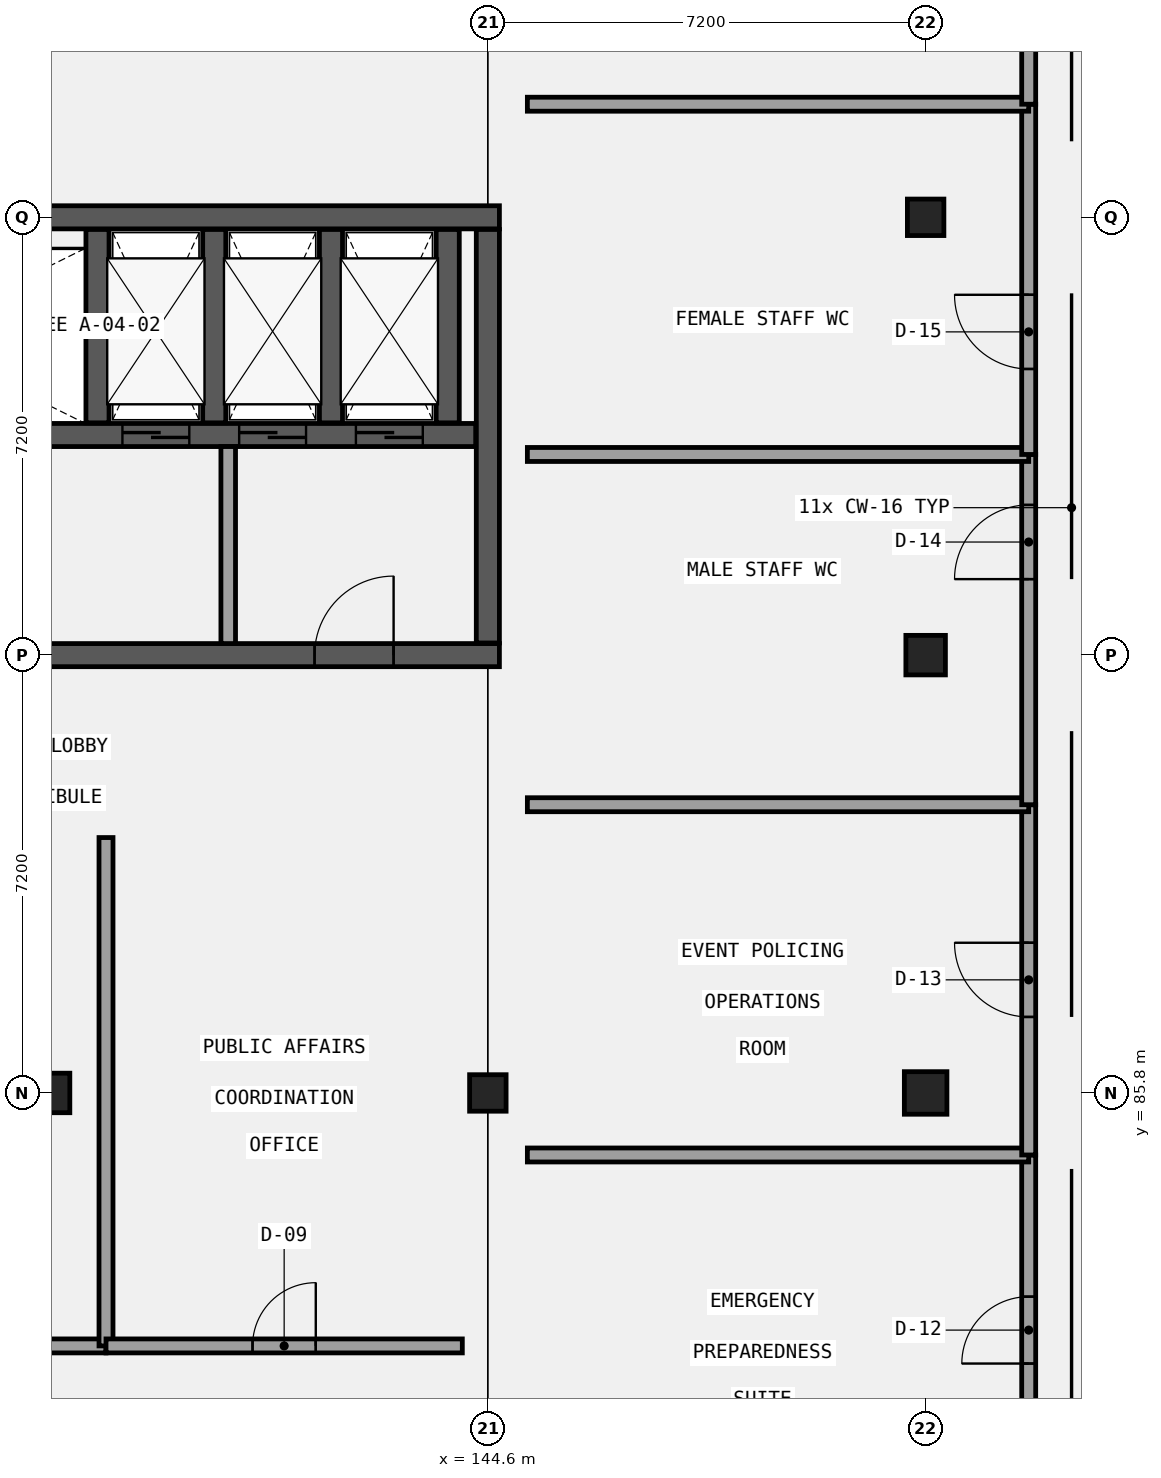
"""IFC4 building model, lengths in metres.
Left out: names, types, materials, properties, quantities, classifications, styles, units other than length and angle.
Written with IfcOpenShell. Run it as: python <this file> out.ifc"""

import sys

from ifc_helpers import new_model, si_unit, direction, frame, frame_2d, origin, origin_2d, place, context, subcontext, project, spatial, rectangle, extrude, element, fill, save


model = new_model("IFC4")
c1 = context("Model", 3, precision=1e-05, world=origin(), true_north=direction((0.0, 1.0)))
c2 = subcontext(c1, "Body", "Model", "MODEL_VIEW")
j1 = project(units=[si_unit("LENGTHUNIT", "METRE"), si_unit("PLANEANGLEUNIT", "RADIAN")], contexts=[c1])
p1 = place(None, origin())
s1 = spatial("IfcSite", under=j1, at=p1, CompositionType="ELEMENT")
p2 = place(p1, origin())
s2 = spatial("IfcBuilding", under=s1, at=p2, CompositionType="ELEMENT")
p3 = place(p2, frame((0.0, 0.0, 9.6)))
s3 = spatial("IfcBuildingStorey", under=s2, at=p3, CompositionType="ELEMENT", Elevation=9.6)
p4 = place(p3, frame((130.01, 100.2, 0.0), z_axis=(0.0, 0.0, 1.0), x_axis=(1.0, 0.0, 0.0)))
e1 = element("IfcWall", 1, at=p4, inside=s3, PredefinedType="SHEAR", context=c2, shape_type="SweptSolid", body=[
    extrude(rectangle(XDim=14.78, YDim=0.38, at=frame_2d((7.39, 0.0))), origin(), (0.0, 0.0, 1.0), 4.2),
])
p5 = place(p3, frame((130.01, 93.0, 0.0), z_axis=(0.0, 0.0, 1.0), x_axis=(1.0, 0.0, 0.0)))
e2 = element("IfcWall", 2, at=p5, inside=s3, PredefinedType="SHEAR", context=c2, shape_type="SweptSolid", body=[
    extrude(rectangle(XDim=14.78, YDim=0.38, at=frame_2d((7.39, 0.0))), origin(), (0.0, 0.0, 1.0), 4.2),
])
p6 = place(p5, frame((3.74, 0.0, 0.0)))
e3 = element("IfcOpeningElement", 3, at=p6, cuts=e2, PredefinedType="OPENING", context=c2, shape_type="SweptSolid", body=[
    extrude(rectangle(XDim=1.3, YDim=2.2, at=frame_2d((0.65, 1.1))), frame((0.0, 0.2, 0.0), z_axis=(0.0, -1.0, 0.0), x_axis=(1.0, 0.0, 0.0)), (0.0, 0.0, 1.0), 0.4),
])
p7 = place(p5, frame((11.74, 0.0, 0.0)))
e4 = element("IfcOpeningElement", 4, at=p7, cuts=e2, PredefinedType="OPENING", context=c2, shape_type="SweptSolid", body=[
    extrude(rectangle(XDim=1.3, YDim=2.2, at=frame_2d((0.65, 1.1))), frame((0.0, 0.2, 0.0), z_axis=(0.0, -1.0, 0.0), x_axis=(1.0, 0.0, 0.0)), (0.0, 0.0, 1.0), 0.4),
])
p8 = place(p3, frame((144.6, 93.2, 0.0), z_axis=(0.0, 0.0, 1.0), x_axis=(0.0, 1.0, 0.0)))
e5 = element("IfcWall", 5, at=p8, inside=s3, PredefinedType="SHEAR", context=c2, shape_type="SweptSolid", body=[
    extrude(rectangle(XDim=6.8, YDim=0.38, at=frame_2d((3.4, 0.0))), origin(), (0.0, 0.0, 1.0), 4.2),
])
p9 = place(p3, frame((130.4, 96.62, 0.0), z_axis=(0.0, 0.0, 1.0), x_axis=(1.0, 0.0, 0.0)))
e6 = element("IfcWall", 6, at=p9, inside=s3, PredefinedType="SHEAR", context=c2, shape_type="SweptSolid", body=[
    extrude(rectangle(XDim=14.0, YDim=0.38, at=frame_2d((7.0, 0.0))), origin(), (0.0, 0.0, 1.0), 4.2),
])
p10 = place(p9, frame((8.19, 0.0, 0.0)))
e7 = element("IfcOpeningElement", 7, at=p10, cuts=e6, PredefinedType="OPENING", context=c2, shape_type="SweptSolid", body=[
    extrude(rectangle(XDim=1.1, YDim=2.15, at=frame_2d((0.55, 1.075))), frame((0.0, 0.2, 0.0), z_axis=(0.0, -1.0, 0.0), x_axis=(1.0, 0.0, 0.0)), (0.0, 0.0, 1.0), 0.4),
])
p11 = place(p9, frame((10.11, 0.0, 0.0)))
e8 = element("IfcOpeningElement", 8, at=p11, cuts=e6, PredefinedType="OPENING", context=c2, shape_type="SweptSolid", body=[
    extrude(rectangle(XDim=1.1, YDim=2.15, at=frame_2d((0.55, 1.075))), frame((0.0, 0.2, 0.0), z_axis=(0.0, -1.0, 0.0), x_axis=(1.0, 0.0, 0.0)), (0.0, 0.0, 1.0), 0.4),
])
p12 = place(p9, frame((12.03, 0.0, 0.0)))
e9 = element("IfcOpeningElement", 9, at=p12, cuts=e6, PredefinedType="OPENING", context=c2, shape_type="SweptSolid", body=[
    extrude(rectangle(XDim=1.1, YDim=2.15, at=frame_2d((0.55, 1.075))), frame((0.0, 0.2, 0.0), z_axis=(0.0, -1.0, 0.0), x_axis=(1.0, 0.0, 0.0)), (0.0, 0.0, 1.0), 0.4),
])
p13 = place(p9, frame((0.375, 0.0, 0.0)))
e10 = element("IfcOpeningElement", 10, at=p13, cuts=e6, PredefinedType="OPENING", context=c2, shape_type="SweptSolid", body=[
    extrude(rectangle(XDim=1.15, YDim=2.15, at=frame_2d((0.575, 1.075))), frame((0.0, 0.2, 0.0), z_axis=(0.0, -1.0, 0.0), x_axis=(1.0, 0.0, 0.0)), (0.0, 0.0, 1.0), 0.4),
])
for number, where, z_axis, x_axis in (
    (11, (138.18, 96.82, 0.0), (0.0, 0.0, 1.0), (0.0, 1.0, 0.0)),
    (12, (140.1, 96.82, 0.0), (0.0, 0.0, 1.0), (0.0, 1.0, 0.0)),
    (13, (142.02, 96.82, 0.0), (0.0, 0.0, 1.0), (0.0, 1.0, 0.0)),
    (14, (143.94, 96.82, 0.0), (0.0, 0.0, 1.0), (0.0, 1.0, 0.0)),
):
    element("IfcWall", number, at=place(p3, frame(where, z_axis=z_axis, x_axis=x_axis)), inside=s3, PredefinedType="SHEAR", context=c2, shape_type="SweptSolid", body=[
        extrude(rectangle(XDim=3.18, YDim=0.38, at=frame_2d((1.59, 0.0))), origin(), (0.0, 0.0, 1.0), 4.2),
    ])
p14 = place(p3, frame((137.4, 85.8, 0.0), z_axis=(0.0, 0.0, 1.0), x_axis=(1.0, 0.0, 0.0)))
e15 = element("IfcColumn", 15, at=p14, inside=s3, PredefinedType="COLUMN", context=c2, shape_type="SweptSolid", body=[
    extrude(rectangle(XDim=0.65, YDim=0.65, at=origin_2d()), origin(), (0.0, 0.0, 1.0), 4.2),
])
p15 = place(p3, frame((144.6, 85.8, 0.0), z_axis=(0.0, 0.0, 1.0), x_axis=(1.0, 0.0, 0.0)))
e16 = element("IfcColumn", 16, at=p15, inside=s3, PredefinedType="COLUMN", context=c2, shape_type="SweptSolid", body=[
    extrude(rectangle(XDim=0.6, YDim=0.6, at=origin_2d()), origin(), (0.0, 0.0, 1.0), 4.2),
])
p16 = place(p3, frame((151.8, 85.8, 0.0), z_axis=(0.0, 0.0, 1.0), x_axis=(1.0, 0.0, 0.0)))
e17 = element("IfcColumn", 17, at=p16, inside=s3, PredefinedType="COLUMN", context=c2, shape_type="SweptSolid", body=[
    extrude(rectangle(XDim=0.7, YDim=0.7, at=origin_2d()), origin(), (0.0, 0.0, 1.0), 4.2),
])
p17 = place(p3, frame((151.8, 93.0, 0.0), z_axis=(0.0, 0.0, 1.0), x_axis=(1.0, 0.0, 0.0)))
e18 = element("IfcColumn", 18, at=p17, inside=s3, PredefinedType="COLUMN", context=c2, shape_type="SweptSolid", body=[
    extrude(rectangle(XDim=0.65, YDim=0.65, at=origin_2d()), origin(), (0.0, 0.0, 1.0), 4.2),
])
p18 = place(p3, frame((151.8, 100.2, 0.0), z_axis=(0.0, 0.0, 1.0), x_axis=(1.0, 0.0, 0.0)))
e19 = element("IfcColumn", 19, at=p18, inside=s3, PredefinedType="COLUMN", context=c2, shape_type="SweptSolid", body=[
    extrude(rectangle(XDim=0.6, YDim=0.6, at=origin_2d()), origin(), (0.0, 0.0, 1.0), 4.2),
])
p19 = place(p3, frame((140.33, 93.19, 0.0), z_axis=(0.0, 0.0, 1.0), x_axis=(0.0, 1.0, 0.0)))
e20 = element("IfcWall", 20, at=p19, inside=s3, PredefinedType="SOLIDWALL", context=c2, shape_type="SweptSolid", body=[
    extrude(rectangle(XDim=3.24, YDim=0.24, at=frame_2d((1.62, 0.0))), origin(), (0.0, 0.0, 1.0), 3.91),
])
p20 = place(p3, frame((132.46, 81.64, 0.0), z_axis=(0.0, 0.0, 1.0), x_axis=(1.0, 0.0, 0.0)))
e21 = element("IfcWall", 21, at=p20, inside=s3, PredefinedType="PARTITIONING", context=c2, shape_type="SweptSolid", body=[
    extrude(rectangle(XDim=5.86, YDim=0.23, at=frame_2d((2.93, 0.0))), origin(), (0.0, 0.0, 1.0), 3.94),
])
p21 = place(p20, frame((2.41, 0.0, 0.0)))
e22 = element("IfcOpeningElement", 22, at=p21, cuts=e21, PredefinedType="OPENING", context=c2, shape_type="SweptSolid", body=[
    extrude(rectangle(XDim=1.04, YDim=2.22, at=frame_2d((0.52, 1.11))), frame((0.0, 0.125, 0.0), z_axis=(0.0, -1.0, 0.0), x_axis=(1.0, 0.0, 0.0)), (0.0, 0.0, 1.0), 0.25),
])
p22 = place(p3, frame((138.32, 81.64, 0.0), z_axis=(0.0, 0.0, 1.0), x_axis=(0.0, 1.0, 0.0)))
e23 = element("IfcWall", 23, at=p22, inside=s3, PredefinedType="PARTITIONING", context=c2, shape_type="SweptSolid", body=[
    extrude(rectangle(XDim=8.36, YDim=0.23, at=frame_2d((4.18, 0.0))), origin(), (0.0, 0.0, 1.0), 3.94),
])
p23 = place(p3, frame((138.32, 81.64, 0.0), z_axis=(0.0, 0.0, 1.0), x_axis=(1.0, 0.0, 0.0)))
e24 = element("IfcWall", 24, at=p23, inside=s3, PredefinedType="PARTITIONING", context=c2, shape_type="SweptSolid", body=[
    extrude(rectangle(XDim=5.86, YDim=0.23, at=frame_2d((2.93, 0.0))), origin(), (0.0, 0.0, 1.0), 3.94),
])
p24 = place(p23, frame((2.41, 0.0, 0.0)))
e25 = element("IfcOpeningElement", 25, at=p24, cuts=e24, PredefinedType="OPENING", context=c2, shape_type="SweptSolid", body=[
    extrude(rectangle(XDim=1.04, YDim=2.35, at=frame_2d((0.52, 1.175))), frame((0.0, 0.125, 0.0), z_axis=(0.0, -1.0, 0.0), x_axis=(1.0, 0.0, 0.0)), (0.0, 0.0, 1.0), 0.25),
])
p25 = place(p3, frame((153.495, 79.02, 0.0), z_axis=(0.0, 0.0, 1.0), x_axis=(0.0, 1.0, 0.0)))
e26 = element("IfcWall", 26, at=p25, inside=s3, PredefinedType="PARTITIONING", context=c2, shape_type="SweptSolid", body=[
    extrude(rectangle(XDim=5.76, YDim=0.23, at=frame_2d((2.88, 0.0))), origin(), (0.0, 0.0, 1.0), 3.94),
])
p26 = place(p25, frame((2.33, 0.0, 0.0)))
e27 = element("IfcOpeningElement", 27, at=p26, cuts=e26, PredefinedType="OPENING", context=c2, shape_type="SweptSolid", body=[
    extrude(rectangle(XDim=1.1, YDim=2.35, at=frame_2d((0.55, 1.175))), frame((0.0, 0.125, 0.0), z_axis=(0.0, -1.0, 0.0), x_axis=(1.0, 0.0, 0.0)), (0.0, 0.0, 1.0), 0.25),
])
p27 = place(p3, frame((145.25, 84.78, 0.0), z_axis=(0.0, 0.0, 1.0), x_axis=(1.0, 0.0, 0.0)))
e28 = element("IfcWall", 28, at=p27, inside=s3, PredefinedType="PARTITIONING", context=c2, shape_type="SweptSolid", body=[
    extrude(rectangle(XDim=8.245, YDim=0.23, at=frame_2d((4.123, 0.0))), origin(), (0.0, 0.0, 1.0), 3.94),
])
p28 = place(p3, frame((153.495, 84.78, 0.0), z_axis=(0.0, 0.0, 1.0), x_axis=(0.0, 1.0, 0.0)))
e29 = element("IfcWall", 29, at=p28, inside=s3, PredefinedType="PARTITIONING", context=c2, shape_type="SweptSolid", body=[
    extrude(rectangle(XDim=5.76, YDim=0.23, at=frame_2d((2.88, 0.0))), origin(), (0.0, 0.0, 1.0), 3.94),
])
p29 = place(p28, frame((2.27, 0.0, 0.0)))
e30 = element("IfcOpeningElement", 30, at=p29, cuts=e29, PredefinedType="OPENING", context=c2, shape_type="SweptSolid", body=[
    extrude(rectangle(XDim=1.22, YDim=2.1, at=frame_2d((0.61, 1.05))), frame((0.0, 0.125, 0.0), z_axis=(0.0, -1.0, 0.0), x_axis=(1.0, 0.0, 0.0)), (0.0, 0.0, 1.0), 0.25),
])
p30 = place(p3, frame((145.25, 90.54, 0.0), z_axis=(0.0, 0.0, 1.0), x_axis=(1.0, 0.0, 0.0)))
e31 = element("IfcWall", 31, at=p30, inside=s3, PredefinedType="PARTITIONING", context=c2, shape_type="SweptSolid", body=[
    extrude(rectangle(XDim=8.245, YDim=0.23, at=frame_2d((4.123, 0.0))), origin(), (0.0, 0.0, 1.0), 3.94),
])
p31 = place(p3, frame((153.495, 90.54, 0.0), z_axis=(0.0, 0.0, 1.0), x_axis=(0.0, 1.0, 0.0)))
e32 = element("IfcWall", 32, at=p31, inside=s3, PredefinedType="PARTITIONING", context=c2, shape_type="SweptSolid", body=[
    extrude(rectangle(XDim=5.76, YDim=0.23, at=frame_2d((2.88, 0.0))), origin(), (0.0, 0.0, 1.0), 3.94),
])
p32 = place(p31, frame((3.71, 0.0, 0.0)))
e33 = element("IfcOpeningElement", 33, at=p32, cuts=e32, PredefinedType="OPENING", context=c2, shape_type="SweptSolid", body=[
    extrude(rectangle(XDim=1.22, YDim=2.22, at=frame_2d((0.61, 1.11))), frame((0.0, 0.125, 0.0), z_axis=(0.0, -1.0, 0.0), x_axis=(1.0, 0.0, 0.0)), (0.0, 0.0, 1.0), 0.25),
])
p33 = place(p3, frame((145.25, 96.3, 0.0), z_axis=(0.0, 0.0, 1.0), x_axis=(1.0, 0.0, 0.0)))
e34 = element("IfcWall", 34, at=p33, inside=s3, PredefinedType="PARTITIONING", context=c2, shape_type="SweptSolid", body=[
    extrude(rectangle(XDim=8.245, YDim=0.23, at=frame_2d((4.123, 0.0))), origin(), (0.0, 0.0, 1.0), 3.39),
])
p34 = place(p3, frame((153.495, 96.3, 0.0), z_axis=(0.0, 0.0, 1.0), x_axis=(0.0, 1.0, 0.0)))
e35 = element("IfcWall", 35, at=p34, inside=s3, PredefinedType="PARTITIONING", context=c2, shape_type="SweptSolid", body=[
    extrude(rectangle(XDim=5.76, YDim=0.23, at=frame_2d((2.88, 0.0))), origin(), (0.0, 0.0, 1.0), 3.94),
])
p35 = place(p34, frame((1.406, 0.0, 0.0)))
e36 = element("IfcOpeningElement", 36, at=p35, cuts=e35, PredefinedType="OPENING", context=c2, shape_type="SweptSolid", body=[
    extrude(rectangle(XDim=1.22, YDim=2.35, at=frame_2d((0.61, 1.175))), frame((0.0, 0.125, 0.0), z_axis=(0.0, -1.0, 0.0), x_axis=(1.0, 0.0, 0.0)), (0.0, 0.0, 1.0), 0.25),
])
p36 = place(p3, frame((145.25, 102.06, 0.0), z_axis=(0.0, 0.0, 1.0), x_axis=(1.0, 0.0, 0.0)))
e37 = element("IfcWall", 37, at=p36, inside=s3, PredefinedType="PARTITIONING", context=c2, shape_type="SweptSolid", body=[
    extrude(rectangle(XDim=8.245, YDim=0.23, at=frame_2d((4.123, 0.0))), origin(), (0.0, 0.0, 1.0), 3.39),
])
p37 = place(p3, frame((153.495, 102.06, 0.0), z_axis=(0.0, 0.0, 1.0), x_axis=(0.0, 1.0, 0.0)))
e38 = element("IfcWall", 38, at=p37, inside=s3, PredefinedType="PARTITIONING", context=c2, shape_type="SweptSolid", body=[
    extrude(rectangle(XDim=5.76, YDim=0.23, at=frame_2d((2.88, 0.0))), origin(), (0.0, 0.0, 1.0), 3.94),
])
p38 = place(p37, frame((2.2, 0.0, 0.0)))
e39 = element("IfcOpeningElement", 39, at=p38, cuts=e38, PredefinedType="OPENING", context=c2, shape_type="SweptSolid", body=[
    extrude(rectangle(XDim=1.36, YDim=2.1, at=frame_2d((0.68, 1.05))), frame((0.0, 0.125, 0.0), z_axis=(0.0, -1.0, 0.0), x_axis=(1.0, 0.0, 0.0)), (0.0, 0.0, 1.0), 0.25),
])
p39 = place(p10, frame((1.1, 0.0, 0.0), z_axis=(0.0, 0.0, 1.0), x_axis=(-1.0, 0.0, 0.0)))
e40 = element("IfcDoor", 40, at=p39, inside=s3, OperationType="DOUBLE_DOOR_SLIDING", PredefinedType="DOOR", context=c2, shape_type="SweptSolid", body=[
    extrude(rectangle(XDim=1.1, YDim=2.15, at=frame_2d((0.55, 1.075))), frame((0.0, 0.025, 0.0), z_axis=(0.0, -1.0, 0.0), x_axis=(1.0, 0.0, 0.0)), (0.0, 0.0, 1.0), 0.05),
])
fill(e7, e40)
p40 = place(p11, frame((1.1, 0.0, 0.0), z_axis=(0.0, 0.0, 1.0), x_axis=(-1.0, 0.0, 0.0)))
e41 = element("IfcDoor", 41, at=p40, inside=s3, OperationType="DOUBLE_DOOR_SLIDING", PredefinedType="DOOR", context=c2, shape_type="SweptSolid", body=[
    extrude(rectangle(XDim=1.1, YDim=2.15, at=frame_2d((0.55, 1.075))), frame((0.0, 0.025, 0.0), z_axis=(0.0, -1.0, 0.0), x_axis=(1.0, 0.0, 0.0)), (0.0, 0.0, 1.0), 0.05),
])
fill(e8, e41)
p41 = place(p12, frame((1.1, 0.0, 0.0), z_axis=(0.0, 0.0, 1.0), x_axis=(-1.0, 0.0, 0.0)))
e42 = element("IfcDoor", 42, at=p41, inside=s3, OperationType="DOUBLE_DOOR_SLIDING", PredefinedType="DOOR", context=c2, shape_type="SweptSolid", body=[
    extrude(rectangle(XDim=1.1, YDim=2.15, at=frame_2d((0.55, 1.075))), frame((0.0, 0.025, 0.0), z_axis=(0.0, -1.0, 0.0), x_axis=(1.0, 0.0, 0.0)), (0.0, 0.0, 1.0), 0.05),
])
fill(e9, e42)
p42 = place(p7, frame((1.3, 0.0, 0.0), z_axis=(0.0, 0.0, 1.0), x_axis=(-1.0, 0.0, 0.0)))
e43 = element("IfcDoor", 43, at=p42, inside=s3, OperationType="SINGLE_SWING_RIGHT", PredefinedType="DOOR", context=c2, shape_type="SweptSolid", body=[
    extrude(rectangle(XDim=1.3, YDim=2.2, at=frame_2d((0.65, 1.1))), frame((0.0, 0.025, 0.0), z_axis=(0.0, -1.0, 0.0), x_axis=(1.0, 0.0, 0.0)), (0.0, 0.0, 1.0), 0.05),
])
fill(e4, e43)
p43 = place(p24, origin())
e44 = element("IfcDoor", 44, at=p43, inside=s3, OperationType="SINGLE_SWING_RIGHT", PredefinedType="DOOR", context=c2, shape_type="SweptSolid", body=[
    extrude(rectangle(XDim=1.04, YDim=2.35, at=frame_2d((0.52, 1.175))), frame((0.0, 0.025, 0.0), z_axis=(0.0, -1.0, 0.0), x_axis=(1.0, 0.0, 0.0)), (0.0, 0.0, 1.0), 0.05),
])
fill(e25, e44)
p44 = place(p26, frame((1.1, 0.0, 0.0), z_axis=(0.0, 0.0, 1.0), x_axis=(-1.0, 0.0, 0.0)))
e45 = element("IfcDoor", 45, at=p44, inside=s3, OperationType="SINGLE_SWING_LEFT", PredefinedType="DOOR", context=c2, shape_type="SweptSolid", body=[
    extrude(rectangle(XDim=1.1, YDim=2.35, at=frame_2d((0.55, 1.175))), frame((0.0, 0.025, 0.0), z_axis=(0.0, -1.0, 0.0), x_axis=(1.0, 0.0, 0.0)), (0.0, 0.0, 1.0), 0.05),
])
fill(e27, e45)
p45 = place(p29, frame((1.22, 0.0, 0.0), z_axis=(0.0, 0.0, 1.0), x_axis=(-1.0, 0.0, 0.0)))
e46 = element("IfcDoor", 46, at=p45, inside=s3, OperationType="SINGLE_SWING_RIGHT", PredefinedType="DOOR", context=c2, shape_type="SweptSolid", body=[
    extrude(rectangle(XDim=1.22, YDim=2.1, at=frame_2d((0.61, 1.05))), frame((0.0, 0.025, 0.0), z_axis=(0.0, -1.0, 0.0), x_axis=(1.0, 0.0, 0.0)), (0.0, 0.0, 1.0), 0.05),
])
fill(e30, e46)
p46 = place(p32, frame((1.22, 0.0, 0.0), z_axis=(0.0, 0.0, 1.0), x_axis=(-1.0, 0.0, 0.0)))
e47 = element("IfcDoor", 47, at=p46, inside=s3, OperationType="SINGLE_SWING_LEFT", PredefinedType="DOOR", context=c2, shape_type="SweptSolid", body=[
    extrude(rectangle(XDim=1.22, YDim=2.22, at=frame_2d((0.61, 1.11))), frame((0.0, 0.025, 0.0), z_axis=(0.0, -1.0, 0.0), x_axis=(1.0, 0.0, 0.0)), (0.0, 0.0, 1.0), 0.05),
])
fill(e33, e47)
p47 = place(p35, frame((1.22, 0.0, 0.0), z_axis=(0.0, 0.0, 1.0), x_axis=(-1.0, 0.0, 0.0)))
e48 = element("IfcDoor", 48, at=p47, inside=s3, OperationType="SINGLE_SWING_RIGHT", PredefinedType="DOOR", context=c2, shape_type="SweptSolid", body=[
    extrude(rectangle(XDim=1.22, YDim=2.35, at=frame_2d((0.61, 1.175))), frame((0.0, 0.025, 0.0), z_axis=(0.0, -1.0, 0.0), x_axis=(1.0, 0.0, 0.0)), (0.0, 0.0, 1.0), 0.05),
])
fill(e36, e48)
save(model, sys.argv[1])
